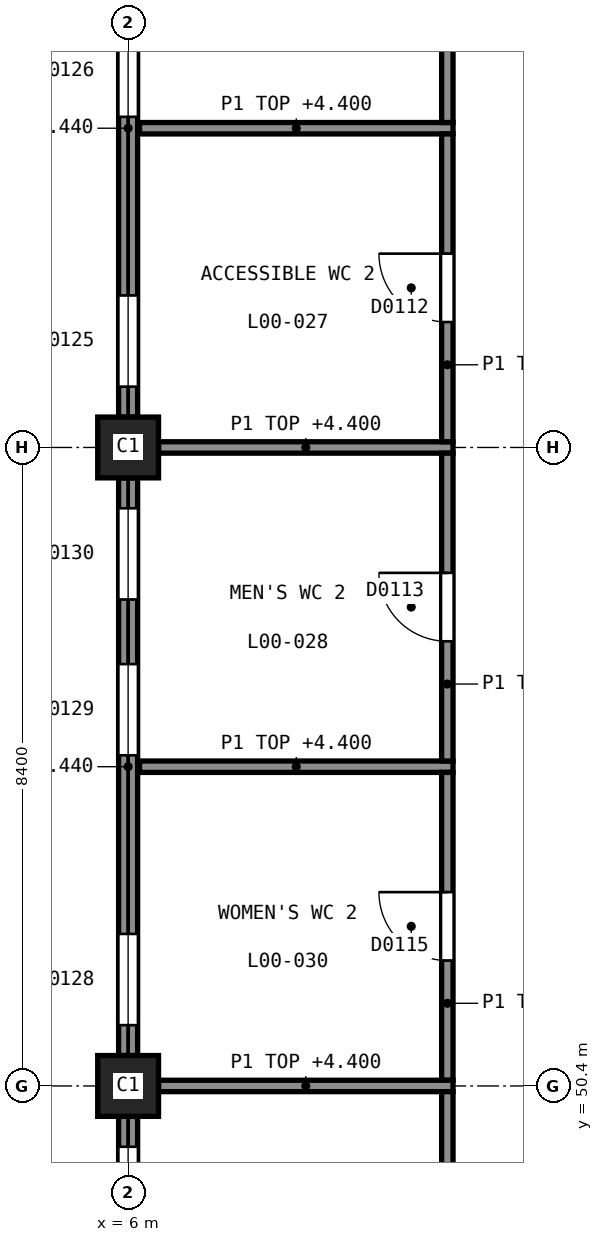
"""IFC4 building model, lengths in metres.
Left out: names, types, materials, properties, quantities, classifications, styles, units other than length and angle.
Written with IfcOpenShell. Run it as: python <this file> out.ifc"""

import sys

from ifc_helpers import new_model, si_unit, direction, frame, frame_2d, origin, origin_2d, place, context, subcontext, project, spatial, rectangle, extrude, element, fill, save


model = new_model("IFC4")
c1 = context("Model", 3, precision=1e-05, world=origin(), true_north=direction((0.0, 1.0)))
c2 = subcontext(c1, "Body", "Model", "MODEL_VIEW")
j1 = project(units=[si_unit("LENGTHUNIT", "METRE"), si_unit("PLANEANGLEUNIT", "RADIAN")], contexts=[c1])
p1 = place(None, origin())
s1 = spatial("IfcSite", under=j1, at=p1, CompositionType="ELEMENT")
p2 = place(p1, origin())
s2 = spatial("IfcBuilding", under=s1, at=p2, CompositionType="ELEMENT")
p3 = place(p2, origin())
s3 = spatial("IfcBuildingStorey", under=s2, at=p3, CompositionType="ELEMENT", Elevation=0.0)
for number, where, z_axis, x_axis in (
    (1, (6.0, 50.4, -0.3), (0.0, 0.0, 1.0), (1.0, 0.0, 0.0)),
    (2, (6.0, 58.8, -0.3), (0.0, 0.0, 1.0), (1.0, 0.0, 0.0)),
):
    element("IfcColumn", number, at=place(p3, frame(where, z_axis=z_axis, x_axis=x_axis)), inside=s3, PredefinedType="COLUMN", context=c2, shape_type="SweptSolid", body=[
        extrude(rectangle(XDim=0.8, YDim=0.8, at=origin_2d()), origin(), (0.0, 0.0, 1.0), 5.8),
    ])
p4 = place(p3, frame((6.0, 59.2, 0.0), z_axis=(0.0, 0.0, 1.0), x_axis=(0.0, 1.0, 0.0)))
e3 = element("IfcWall", 3, at=p4, inside=s3, PredefinedType="SOLIDWALL", context=c2, shape_type="SweptSolid", body=[
    extrude(rectangle(XDim=7.6, YDim=0.25, at=frame_2d((3.8, 0.0))), origin(), (0.0, 0.0, 1.0), 4.44),
])
p5 = place(p4, frame((0.4, 0.0, 0.9)))
e4 = element("IfcOpeningElement", 4, at=p5, cuts=e3, PredefinedType="OPENING", context=c2, shape_type="SweptSolid", body=[
    extrude(rectangle(XDim=1.2, YDim=2.1, at=frame_2d((0.6, 1.05))), frame((0.0, 0.135, 0.0), z_axis=(0.0, -1.0, 0.0), x_axis=(1.0, 0.0, 0.0)), (0.0, 0.0, 1.0), 0.27),
])
p6 = place(p4, frame((3.95, 0.0, 0.9)))
e5 = element("IfcOpeningElement", 5, at=p6, cuts=e3, PredefinedType="OPENING", context=c2, shape_type="SweptSolid", body=[
    extrude(rectangle(XDim=1.2, YDim=2.1, at=frame_2d((0.6, 1.05))), frame((0.0, 0.135, 0.0), z_axis=(0.0, -1.0, 0.0), x_axis=(1.0, 0.0, 0.0)), (0.0, 0.0, 1.0), 0.27),
])
p7 = place(p4, frame((6.0, 0.0, 0.9)))
e6 = element("IfcOpeningElement", 6, at=p7, cuts=e3, PredefinedType="OPENING", context=c2, shape_type="SweptSolid", body=[
    extrude(rectangle(XDim=1.2, YDim=2.1, at=frame_2d((0.6, 1.05))), frame((0.0, 0.135, 0.0), z_axis=(0.0, -1.0, 0.0), x_axis=(1.0, 0.0, 0.0)), (0.0, 0.0, 1.0), 0.27),
])
p8 = place(p3, frame((6.0, 50.8, 0.0), z_axis=(0.0, 0.0, 1.0), x_axis=(0.0, 1.0, 0.0)))
e7 = element("IfcWall", 7, at=p8, inside=s3, PredefinedType="SOLIDWALL", context=c2, shape_type="SweptSolid", body=[
    extrude(rectangle(XDim=7.6, YDim=0.25, at=frame_2d((3.8, 0.0))), origin(), (0.0, 0.0, 1.0), 4.44),
])
p9 = place(p8, frame((0.4, 0.0, 0.9)))
e8 = element("IfcOpeningElement", 8, at=p9, cuts=e7, PredefinedType="OPENING", context=c2, shape_type="SweptSolid", body=[
    extrude(rectangle(XDim=1.2, YDim=2.1, at=frame_2d((0.6, 1.05))), frame((0.0, 0.135, 0.0), z_axis=(0.0, -1.0, 0.0), x_axis=(1.0, 0.0, 0.0)), (0.0, 0.0, 1.0), 0.27),
])
p10 = place(p8, frame((3.95, 0.0, 0.9)))
e9 = element("IfcOpeningElement", 9, at=p10, cuts=e7, PredefinedType="OPENING", context=c2, shape_type="SweptSolid", body=[
    extrude(rectangle(XDim=1.2, YDim=2.1, at=frame_2d((0.6, 1.05))), frame((0.0, 0.135, 0.0), z_axis=(0.0, -1.0, 0.0), x_axis=(1.0, 0.0, 0.0)), (0.0, 0.0, 1.0), 0.27),
])
p11 = place(p8, frame((6.0, 0.0, 0.9)))
e10 = element("IfcOpeningElement", 10, at=p11, cuts=e7, PredefinedType="OPENING", context=c2, shape_type="SweptSolid", body=[
    extrude(rectangle(XDim=1.2, YDim=2.1, at=frame_2d((0.6, 1.05))), frame((0.0, 0.135, 0.0), z_axis=(0.0, -1.0, 0.0), x_axis=(1.0, 0.0, 0.0)), (0.0, 0.0, 1.0), 0.27),
])
p12 = place(p3, frame((6.0, 42.4, 0.0), z_axis=(0.0, 0.0, 1.0), x_axis=(0.0, 1.0, 0.0)))
e11 = element("IfcWall", 11, at=p12, inside=s3, PredefinedType="SOLIDWALL", context=c2, shape_type="SweptSolid", body=[
    extrude(rectangle(XDim=7.6, YDim=0.25, at=frame_2d((3.8, 0.0))), origin(), (0.0, 0.0, 1.0), 4.44),
])
p13 = place(p12, frame((0.4, 0.0, 0.9)))
e12 = element("IfcOpeningElement", 12, at=p13, cuts=e11, PredefinedType="OPENING", context=c2, shape_type="SweptSolid", body=[
    extrude(rectangle(XDim=1.2, YDim=2.1, at=frame_2d((0.6, 1.05))), frame((0.0, 0.135, 0.0), z_axis=(0.0, -1.0, 0.0), x_axis=(1.0, 0.0, 0.0)), (0.0, 0.0, 1.0), 0.27),
])
p14 = place(p12, frame((3.2, 0.0, 0.9)))
e13 = element("IfcOpeningElement", 13, at=p14, cuts=e11, PredefinedType="OPENING", context=c2, shape_type="SweptSolid", body=[
    extrude(rectangle(XDim=1.2, YDim=2.1, at=frame_2d((0.6, 1.05))), frame((0.0, 0.135, 0.0), z_axis=(0.0, -1.0, 0.0), x_axis=(1.0, 0.0, 0.0)), (0.0, 0.0, 1.0), 0.27),
])
p15 = place(p12, frame((6.0, 0.0, 0.9)))
e14 = element("IfcOpeningElement", 14, at=p15, cuts=e11, PredefinedType="OPENING", context=c2, shape_type="SweptSolid", body=[
    extrude(rectangle(XDim=1.2, YDim=2.1, at=frame_2d((0.6, 1.05))), frame((0.0, 0.135, 0.0), z_axis=(0.0, -1.0, 0.0), x_axis=(1.0, 0.0, 0.0)), (0.0, 0.0, 1.0), 0.27),
])
for number, where, z_axis, x_axis in (
    (15, (6.15, 63.0, 0.0), (0.0, 0.0, 1.0), (1.0, 0.0, 0.0)),
    (16, (10.2, 63.075, 0.0), (0.0, 0.0, 1.0), (0.0, 1.0, 0.0)),
):
    element("IfcWall", number, at=place(p3, frame(where, z_axis=z_axis, x_axis=x_axis)), inside=s3, PredefinedType="PARTITIONING", context=c2, shape_type="SweptSolid", body=[
        extrude(rectangle(XDim=4.125, YDim=0.15, at=frame_2d((2.062, 0.0))), origin(), (0.0, 0.0, 1.0), 4.4),
    ])
p16 = place(p3, frame((6.4, 58.8, 0.0), z_axis=(0.0, 0.0, 1.0), x_axis=(1.0, 0.0, 0.0)))
e17 = element("IfcWall", 17, at=p16, inside=s3, PredefinedType="PARTITIONING", context=c2, shape_type="SweptSolid", body=[
    extrude(rectangle(XDim=3.875, YDim=0.15, at=frame_2d((1.938, 0.0))), origin(), (0.0, 0.0, 1.0), 4.4),
])
p17 = place(p3, frame((10.2, 58.875, 0.0), z_axis=(0.0, 0.0, 1.0), x_axis=(0.0, 1.0, 0.0)))
e18 = element("IfcWall", 18, at=p17, inside=s3, PredefinedType="PARTITIONING", context=c2, shape_type="SweptSolid", body=[
    extrude(rectangle(XDim=4.05, YDim=0.15, at=frame_2d((2.025, 0.0))), origin(), (0.0, 0.0, 1.0), 4.4),
])
p18 = place(p17, frame((1.575, 0.0, 0.0)))
e19 = element("IfcOpeningElement", 19, at=p18, cuts=e18, PredefinedType="OPENING", context=c2, shape_type="SweptSolid", body=[
    extrude(rectangle(XDim=0.9, YDim=2.1, at=frame_2d((0.45, 1.05))), frame((0.0, 0.085, 0.0), z_axis=(0.0, -1.0, 0.0), x_axis=(1.0, 0.0, 0.0)), (0.0, 0.0, 1.0), 0.17),
])
p19 = place(p3, frame((6.15, 54.6, 0.0), z_axis=(0.0, 0.0, 1.0), x_axis=(1.0, 0.0, 0.0)))
e20 = element("IfcWall", 20, at=p19, inside=s3, PredefinedType="PARTITIONING", context=c2, shape_type="SweptSolid", body=[
    extrude(rectangle(XDim=4.125, YDim=0.15, at=frame_2d((2.062, 0.0))), origin(), (0.0, 0.0, 1.0), 4.4),
])
p20 = place(p3, frame((10.2, 54.675, 0.0), z_axis=(0.0, 0.0, 1.0), x_axis=(0.0, 1.0, 0.0)))
e21 = element("IfcWall", 21, at=p20, inside=s3, PredefinedType="PARTITIONING", context=c2, shape_type="SweptSolid", body=[
    extrude(rectangle(XDim=4.05, YDim=0.15, at=frame_2d((2.025, 0.0))), origin(), (0.0, 0.0, 1.0), 4.4),
])
p21 = place(p20, frame((1.575, 0.0, 0.0)))
e22 = element("IfcOpeningElement", 22, at=p21, cuts=e21, PredefinedType="OPENING", context=c2, shape_type="SweptSolid", body=[
    extrude(rectangle(XDim=0.9, YDim=2.1, at=frame_2d((0.45, 1.05))), frame((0.0, 0.085, 0.0), z_axis=(0.0, -1.0, 0.0), x_axis=(1.0, 0.0, 0.0)), (0.0, 0.0, 1.0), 0.17),
])
p22 = place(p3, frame((10.2, 50.475, 0.0), z_axis=(0.0, 0.0, 1.0), x_axis=(0.0, 1.0, 0.0)))
e23 = element("IfcWall", 23, at=p22, inside=s3, PredefinedType="PARTITIONING", context=c2, shape_type="SweptSolid", body=[
    extrude(rectangle(XDim=4.05, YDim=0.15, at=frame_2d((2.025, 0.0))), origin(), (0.0, 0.0, 1.0), 4.4),
])
p23 = place(p22, frame((1.575, 0.0, 0.0)))
e24 = element("IfcOpeningElement", 24, at=p23, cuts=e23, PredefinedType="OPENING", context=c2, shape_type="SweptSolid", body=[
    extrude(rectangle(XDim=0.9, YDim=2.1, at=frame_2d((0.45, 1.05))), frame((0.0, 0.085, 0.0), z_axis=(0.0, -1.0, 0.0), x_axis=(1.0, 0.0, 0.0)), (0.0, 0.0, 1.0), 0.17),
])
p24 = place(p3, frame((6.4, 50.4, 0.0), z_axis=(0.0, 0.0, 1.0), x_axis=(1.0, 0.0, 0.0)))
e25 = element("IfcWall", 25, at=p24, inside=s3, PredefinedType="PARTITIONING", context=c2, shape_type="SweptSolid", body=[
    extrude(rectangle(XDim=3.875, YDim=0.15, at=frame_2d((1.938, 0.0))), origin(), (0.0, 0.0, 1.0), 4.4),
])
p25 = place(p3, frame((10.2, 42.0, 0.0), z_axis=(0.0, 0.0, 1.0), x_axis=(0.0, 1.0, 0.0)))
e26 = element("IfcWall", 26, at=p25, inside=s3, PredefinedType="PARTITIONING", context=c2, shape_type="SweptSolid", body=[
    extrude(rectangle(XDim=8.325, YDim=0.15, at=frame_2d((4.163, 0.0))), origin(), (0.0, 0.0, 1.0), 4.4),
])
p26 = place(p5, origin())
e27 = element("IfcWindow", 27, at=p26, inside=s3, PartitioningType="SINGLE_PANEL", PredefinedType="WINDOW", context=c2, shape_type="SweptSolid", body=[
    extrude(rectangle(XDim=1.2, YDim=2.1, at=frame_2d((0.6, 1.05))), frame((0.0, -0.045, 0.0), z_axis=(0.0, -1.0, 0.0), x_axis=(1.0, 0.0, 0.0)), (0.0, 0.0, 1.0), 0.06),
])
fill(e4, e27)
p27 = place(p6, origin())
e28 = element("IfcWindow", 28, at=p27, inside=s3, PartitioningType="SINGLE_PANEL", PredefinedType="WINDOW", context=c2, shape_type="SweptSolid", body=[
    extrude(rectangle(XDim=1.2, YDim=2.1, at=frame_2d((0.6, 1.05))), frame((0.0, -0.045, 0.0), z_axis=(0.0, -1.0, 0.0), x_axis=(1.0, 0.0, 0.0)), (0.0, 0.0, 1.0), 0.06),
])
fill(e5, e28)
p28 = place(p9, origin())
e29 = element("IfcWindow", 29, at=p28, inside=s3, PartitioningType="SINGLE_PANEL", PredefinedType="WINDOW", context=c2, shape_type="SweptSolid", body=[
    extrude(rectangle(XDim=1.2, YDim=2.1, at=frame_2d((0.6, 1.05))), frame((0.0, -0.045, 0.0), z_axis=(0.0, -1.0, 0.0), x_axis=(1.0, 0.0, 0.0)), (0.0, 0.0, 1.0), 0.06),
])
fill(e8, e29)
p29 = place(p10, origin())
e30 = element("IfcWindow", 30, at=p29, inside=s3, PartitioningType="SINGLE_PANEL", PredefinedType="WINDOW", context=c2, shape_type="SweptSolid", body=[
    extrude(rectangle(XDim=1.2, YDim=2.1, at=frame_2d((0.6, 1.05))), frame((0.0, -0.045, 0.0), z_axis=(0.0, -1.0, 0.0), x_axis=(1.0, 0.0, 0.0)), (0.0, 0.0, 1.0), 0.06),
])
fill(e9, e30)
p30 = place(p11, origin())
e31 = element("IfcWindow", 31, at=p30, inside=s3, PartitioningType="SINGLE_PANEL", PredefinedType="WINDOW", context=c2, shape_type="SweptSolid", body=[
    extrude(rectangle(XDim=1.2, YDim=2.1, at=frame_2d((0.6, 1.05))), frame((0.0, -0.045, 0.0), z_axis=(0.0, -1.0, 0.0), x_axis=(1.0, 0.0, 0.0)), (0.0, 0.0, 1.0), 0.06),
])
fill(e10, e31)
p31 = place(p15, origin())
e32 = element("IfcWindow", 32, at=p31, inside=s3, PartitioningType="SINGLE_PANEL", PredefinedType="WINDOW", context=c2, shape_type="SweptSolid", body=[
    extrude(rectangle(XDim=1.2, YDim=2.1, at=frame_2d((0.6, 1.05))), frame((0.0, -0.045, 0.0), z_axis=(0.0, -1.0, 0.0), x_axis=(1.0, 0.0, 0.0)), (0.0, 0.0, 1.0), 0.06),
])
fill(e14, e32)
p32 = place(p18, origin())
e33 = element("IfcDoor", 33, at=p32, inside=s3, OperationType="SINGLE_SWING_LEFT", PredefinedType="DOOR", context=c2, shape_type="SweptSolid", body=[
    extrude(rectangle(XDim=0.9, YDim=2.1, at=frame_2d((0.45, 1.05))), frame((0.0, 0.025, 0.0), z_axis=(0.0, -1.0, 0.0), x_axis=(1.0, 0.0, 0.0)), (0.0, 0.0, 1.0), 0.05),
])
fill(e19, e33)
p33 = place(p21, origin())
e34 = element("IfcDoor", 34, at=p33, inside=s3, OperationType="SINGLE_SWING_LEFT", PredefinedType="DOOR", context=c2, shape_type="SweptSolid", body=[
    extrude(rectangle(XDim=0.9, YDim=2.1, at=frame_2d((0.45, 1.05))), frame((0.0, 0.025, 0.0), z_axis=(0.0, -1.0, 0.0), x_axis=(1.0, 0.0, 0.0)), (0.0, 0.0, 1.0), 0.05),
])
fill(e22, e34)
p34 = place(p23, origin())
e35 = element("IfcDoor", 35, at=p34, inside=s3, OperationType="SINGLE_SWING_LEFT", PredefinedType="DOOR", context=c2, shape_type="SweptSolid", body=[
    extrude(rectangle(XDim=0.9, YDim=2.1, at=frame_2d((0.45, 1.05))), frame((0.0, 0.025, 0.0), z_axis=(0.0, -1.0, 0.0), x_axis=(1.0, 0.0, 0.0)), (0.0, 0.0, 1.0), 0.05),
])
fill(e24, e35)
save(model, sys.argv[1])
